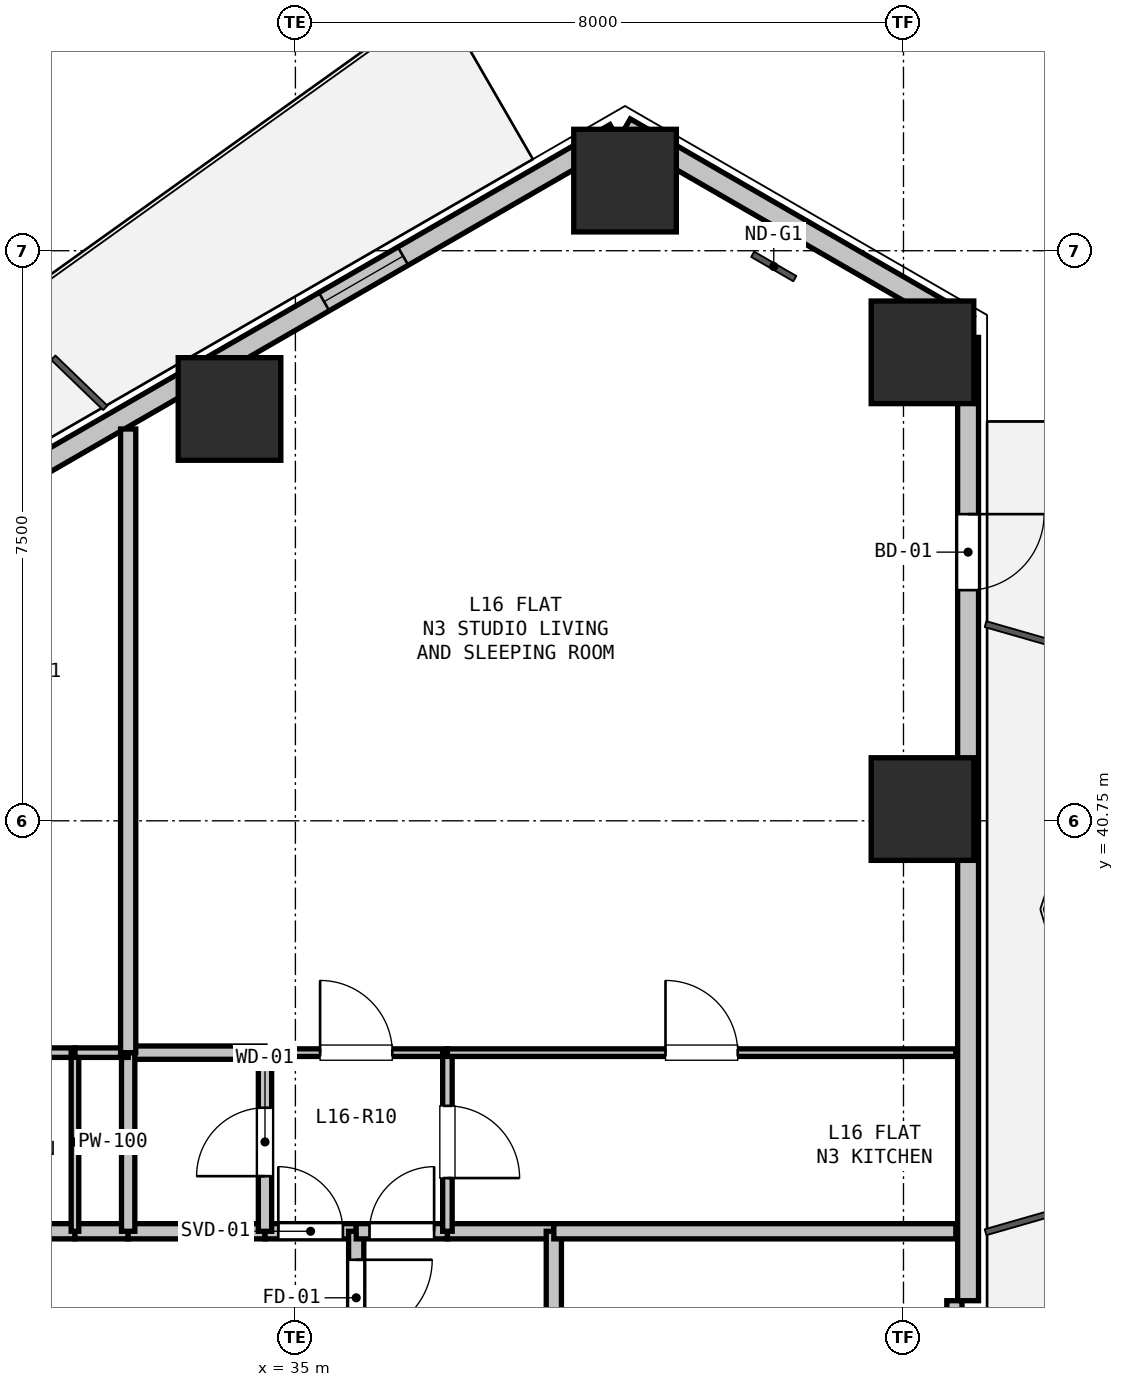
"""IFC4 building model, lengths in metres.
Left out: names, types, materials, properties, quantities, classifications, styles, units other than length and angle.
Written with IfcOpenShell. Run it as: python <this file> out.ifc"""

import sys

from ifc_helpers import new_model, si_unit, direction, frame, frame_2d, origin, origin_2d, place, context, subcontext, project, spatial, rectangle, hollow_rectangle, extrude, element, fill, save


model = new_model("IFC4")
c1 = context("Model", 3, precision=1e-05, world=origin(), true_north=direction((0.0, 1.0)))
c2 = subcontext(c1, "Body", "Model", "MODEL_VIEW")
j1 = project(units=[si_unit("LENGTHUNIT", "METRE"), si_unit("PLANEANGLEUNIT", "RADIAN")], contexts=[c1])
p1 = place(None, origin())
s1 = spatial("IfcSite", under=j1, at=p1, CompositionType="ELEMENT")
p2 = place(p1, origin())
s2 = spatial("IfcBuilding", under=s1, at=p2, CompositionType="ELEMENT")
p3 = place(p2, frame((0.0, 0.0, 58.8)))
s3 = spatial("IfcBuildingStorey", under=s2, at=p3, CompositionType="ELEMENT", Elevation=58.8)
for number, where, z_axis, x_axis in (
    (1, (34.133, 46.168, 0.0), (0.0, 0.0, 1.0), (1.0, 0.0, 0.0)),
    (2, (39.337, 49.173, 0.0), (0.0, 0.0, 1.0), (1.0, 0.0, 0.0)),
    (3, (43.25, 46.913, 0.0), (0.0, 0.0, 1.0), (1.0, 0.0, 0.0)),
    (4, (43.25, 40.905, 0.0), (0.0, 0.0, 1.0), (1.0, 0.0, 0.0)),
):
    element("IfcColumn", number, at=place(p3, frame(where, z_axis=z_axis, x_axis=x_axis)), inside=s3, PredefinedType="COLUMN", context=c2, shape_type="SweptSolid", body=[
        extrude(hollow_rectangle(XDim=1.35, YDim=1.35, WallThickness=0.036, at=origin_2d()), origin(), (0.0, 0.0, 1.0), 3.3),
    ])
p4 = place(p3, frame((39.337, 49.865, 0.0), z_axis=(0.0, 0.0, 1.0), x_axis=(0.866043601342, -0.499968479581, 0.0)))
e5 = element("IfcWall", 5, at=p4, inside=s3, PredefinedType="SOLIDWALL", context=c2, shape_type="SweptSolid", body=[
    extrude(rectangle(XDim=5.211, YDim=0.275, at=frame_2d((2.605, 0.0))), origin(), (0.0, 0.0, 1.0), 2.64),
])
p5 = place(p3, frame((28.232, 43.454, 0.0), z_axis=(0.0, 0.0, 1.0), x_axis=(0.86603192154, 0.499988710747, 0.0)))
e6 = element("IfcWall", 6, at=p5, inside=s3, PredefinedType="SOLIDWALL", context=c2, shape_type="SweptSolid", body=[
    extrude(rectangle(XDim=12.673, YDim=0.275, at=frame_2d((6.336, 0.0))), origin(), (0.0, 0.0, 1.0), 2.64),
])
p6 = place(p5, frame((2.417, 0.0, 0.9)))
e7 = element("IfcOpeningElement", 7, at=p6, cuts=e6, PredefinedType="OPENING", context=c2, shape_type="SweptSolid", body=[
    extrude(rectangle(XDim=1.2, YDim=1.4, at=frame_2d((0.6, 0.7))), frame((0.0, 0.147, 0.0), z_axis=(0.0, -1.0, 0.0), x_axis=(1.0, 0.0, 0.0)), (0.0, 0.0, 1.0), 0.295),
])
p7 = place(p5, frame((8.251, 0.0, 0.9)))
e8 = element("IfcOpeningElement", 8, at=p7, cuts=e6, PredefinedType="OPENING", context=c2, shape_type="SweptSolid", body=[
    extrude(rectangle(XDim=1.2, YDim=1.4, at=frame_2d((0.6, 0.7))), frame((0.0, 0.147, 0.0), z_axis=(0.0, -1.0, 0.0), x_axis=(1.0, 0.0, 0.0)), (0.0, 0.0, 1.0), 0.295),
])
p8 = place(p3, frame((43.85, 47.11, 0.0), z_axis=(0.0, 0.0, 1.0), x_axis=(0.0, -1.0, 0.0)))
e9 = element("IfcWall", 9, at=p8, inside=s3, PredefinedType="SOLIDWALL", context=c2, shape_type="SweptSolid", body=[
    extrude(rectangle(XDim=12.673, YDim=0.275, at=frame_2d((6.336, 0.0))), origin(), (0.0, 0.0, 1.0), 2.64),
])
p9 = place(p8, frame((2.325, 0.0, 0.0)))
e10 = element("IfcOpeningElement", 10, at=p9, cuts=e9, PredefinedType="OPENING", context=c2, shape_type="SweptSolid", body=[
    extrude(rectangle(XDim=1.0, YDim=2.1, at=frame_2d((0.5, 1.05))), frame((0.0, 0.147, 0.0), z_axis=(0.0, -1.0, 0.0), x_axis=(1.0, 0.0, 0.0)), (0.0, 0.0, 1.0), 0.295),
])
p10 = place(p3, frame((43.67, 34.437, 0.0), z_axis=(0.0, 0.0, 1.0), x_axis=(0.0, -1.0, 0.0)))
e11 = element("IfcWall", 11, at=p10, inside=s3, PredefinedType="PARAPET", context=c2, shape_type="SweptSolid", body=[
    extrude(rectangle(XDim=1.7, YDim=0.2, at=frame_2d((0.85, 0.0))), origin(), (0.0, 0.0, 1.0), 2.64),
])
p11 = place(p3, frame((29.1, 35.35, 0.0), z_axis=(0.0, 0.0, 1.0), x_axis=(1.0, 0.0, 0.0)))
e12 = element("IfcWall", 12, at=p11, inside=s3, PredefinedType="PARTITIONING", context=c2, shape_type="SweptSolid", body=[
    extrude(rectangle(XDim=3.0, YDim=0.2, at=frame_2d((1.5, 0.0))), origin(), (0.0, 0.0, 1.0), 3.02),
])
p12 = place(p3, frame((32.1, 35.35, 0.0), z_axis=(0.0, 0.0, 1.0), x_axis=(1.0, 0.0, 0.0)))
e13 = element("IfcWall", 13, at=p12, inside=s3, PredefinedType="PARTITIONING", context=c2, shape_type="SweptSolid", body=[
    extrude(rectangle(XDim=0.7, YDim=0.2, at=frame_2d((0.35, 0.0))), origin(), (0.0, 0.0, 1.0), 3.02),
])
p13 = place(p3, frame((32.8, 35.35, 0.0), z_axis=(0.0, 0.0, 1.0), x_axis=(1.0, 0.0, 0.0)))
e14 = element("IfcWall", 14, at=p13, inside=s3, PredefinedType="PARTITIONING", context=c2, shape_type="SweptSolid", body=[
    extrude(rectangle(XDim=1.8, YDim=0.2, at=frame_2d((0.9, 0.0))), origin(), (0.0, 0.0, 1.0), 3.02),
])
p14 = place(p3, frame((34.6, 35.35, 0.0), z_axis=(0.0, 0.0, 1.0), x_axis=(1.0, 0.0, 0.0)))
e15 = element("IfcWall", 15, at=p14, inside=s3, PredefinedType="PARTITIONING", context=c2, shape_type="SweptSolid", body=[
    extrude(rectangle(XDim=1.2, YDim=0.2, at=frame_2d((0.6, 0.0))), origin(), (0.0, 0.0, 1.0), 3.02),
])
p15 = place(p14, frame((0.175, 0.0, 0.0)))
e16 = element("IfcOpeningElement", 16, at=p15, cuts=e15, PredefinedType="OPENING", context=c2, shape_type="SweptSolid", body=[
    extrude(rectangle(XDim=0.85, YDim=2.1, at=frame_2d((0.425, 1.05))), frame((0.0, 0.11, 0.0), z_axis=(0.0, -1.0, 0.0), x_axis=(1.0, 0.0, 0.0)), (0.0, 0.0, 1.0), 0.22),
])
p16 = place(p3, frame((35.8, 35.35, 0.0), z_axis=(0.0, 0.0, 1.0), x_axis=(0.0, -1.0, 0.0)))
e17 = element("IfcWall", 17, at=p16, inside=s3, PredefinedType="PARTITIONING", context=c2, shape_type="SweptSolid", body=[
    extrude(rectangle(XDim=1.75, YDim=0.2, at=frame_2d((0.875, 0.0))), origin(), (0.0, 0.0, 1.0), 3.02),
])
p17 = place(p16, frame((0.375, 0.0, 0.0)))
e18 = element("IfcOpeningElement", 18, at=p17, cuts=e17, PredefinedType="OPENING", context=c2, shape_type="SweptSolid", body=[
    extrude(rectangle(XDim=1.0, YDim=2.15, at=frame_2d((0.5, 1.075))), frame((0.0, 0.11, 0.0), z_axis=(0.0, -1.0, 0.0), x_axis=(1.0, 0.0, 0.0)), (0.0, 0.0, 1.0), 0.22),
])
p18 = place(p3, frame((35.8, 35.35, 0.0), z_axis=(0.0, 0.0, 1.0), x_axis=(1.0, 0.0, 0.0)))
e19 = element("IfcWall", 19, at=p18, inside=s3, PredefinedType="PARTITIONING", context=c2, shape_type="SweptSolid", body=[
    extrude(rectangle(XDim=1.2, YDim=0.2, at=frame_2d((0.6, 0.0))), origin(), (0.0, 0.0, 1.0), 2.317),
])
p19 = place(p18, frame((0.175, 0.0, 0.0)))
e20 = element("IfcOpeningElement", 20, at=p19, cuts=e19, PredefinedType="OPENING", context=c2, shape_type="SweptSolid", body=[
    extrude(rectangle(XDim=0.85, YDim=2.1, at=frame_2d((0.425, 1.05))), frame((0.0, 0.11, 0.0), z_axis=(0.0, -1.0, 0.0), x_axis=(1.0, 0.0, 0.0)), (0.0, 0.0, 1.0), 0.22),
])
p20 = place(p3, frame((37.0, 35.35, 0.0), z_axis=(0.0, 0.0, 1.0), x_axis=(1.0, 0.0, 0.0)))
e21 = element("IfcWall", 21, at=p20, inside=s3, PredefinedType="PARTITIONING", context=c2, shape_type="SweptSolid", body=[
    extrude(rectangle(XDim=1.4, YDim=0.2, at=frame_2d((0.7, 0.0))), origin(), (0.0, 0.0, 1.0), 2.317),
])
p21 = place(p3, frame((38.4, 35.35, 0.0), z_axis=(0.0, 0.0, 1.0), x_axis=(0.0, -1.0, 0.0)))
e22 = element("IfcWall", 22, at=p21, inside=s3, PredefinedType="PARTITIONING", context=c2, shape_type="SweptSolid", body=[
    extrude(rectangle(XDim=6.95, YDim=0.2, at=frame_2d((3.475, 0.0))), origin(), (0.0, 0.0, 1.0), 2.317),
])
p22 = place(p3, frame((34.6, 37.7, 0.0), z_axis=(0.0, 0.0, 1.0), x_axis=(1.0, 0.0, 0.0)))
e23 = element("IfcWall", 23, at=p22, inside=s3, PredefinedType="PARTITIONING", context=c2, shape_type="SweptSolid", body=[
    extrude(rectangle(XDim=2.4, YDim=0.1, at=frame_2d((1.2, 0.0))), origin(), (0.0, 0.0, 1.0), 2.317),
])
p23 = place(p22, frame((0.725, 0.0, 0.0)))
e24 = element("IfcOpeningElement", 24, at=p23, cuts=e23, PredefinedType="OPENING", context=c2, shape_type="SweptSolid", body=[
    extrude(rectangle(XDim=0.95, YDim=2.1, at=frame_2d((0.475, 1.05))), frame((0.0, 0.06, 0.0), z_axis=(0.0, -1.0, 0.0), x_axis=(1.0, 0.0, 0.0)), (0.0, 0.0, 1.0), 0.12),
])
p24 = place(p3, frame((37.0, 37.7, 0.0), z_axis=(0.0, 0.0, 1.0), x_axis=(0.0, -1.0, 0.0)))
e25 = element("IfcWall", 25, at=p24, inside=s3, PredefinedType="PARTITIONING", context=c2, shape_type="SweptSolid", body=[
    extrude(rectangle(XDim=2.35, YDim=0.125, at=frame_2d((1.175, 0.0))), origin(), (0.0, 0.0, 1.0), 2.317),
])
p25 = place(p24, frame((0.7, 0.0, 0.0)))
e26 = element("IfcOpeningElement", 26, at=p25, cuts=e25, PredefinedType="OPENING", context=c2, shape_type="SweptSolid", body=[
    extrude(rectangle(XDim=0.95, YDim=2.1, at=frame_2d((0.475, 1.05))), frame((0.0, 0.073, 0.0), z_axis=(0.0, -1.0, 0.0), x_axis=(1.0, 0.0, 0.0)), (0.0, 0.0, 1.0), 0.145),
])
p26 = place(p3, frame((34.6, 35.35, 0.0), z_axis=(0.0, 0.0, 1.0), x_axis=(0.0, 1.0, 0.0)))
e27 = element("IfcWall", 27, at=p26, inside=s3, PredefinedType="PLUMBINGWALL", context=c2, shape_type="SweptSolid", body=[
    extrude(rectangle(XDim=2.35, YDim=0.175, at=frame_2d((1.175, 0.0))), origin(), (0.0, 0.0, 1.0), 3.02),
])
p27 = place(p26, frame((0.725, 0.0, 0.0)))
e28 = element("IfcOpeningElement", 28, at=p27, cuts=e27, PredefinedType="OPENING", context=c2, shape_type="SweptSolid", body=[
    extrude(rectangle(XDim=0.9, YDim=2.1, at=frame_2d((0.45, 1.05))), frame((0.0, 0.097, 0.0), z_axis=(0.0, -1.0, 0.0), x_axis=(1.0, 0.0, 0.0)), (0.0, 0.0, 1.0), 0.195),
])
p28 = place(p3, frame((29.2, 37.7, 0.0), z_axis=(0.0, 0.0, 1.0), x_axis=(1.0, 0.0, 0.0)))
e29 = element("IfcWall", 29, at=p28, inside=s3, PredefinedType="PARTITIONING", context=c2, shape_type="SweptSolid", body=[
    extrude(rectangle(XDim=2.9, YDim=0.125, at=frame_2d((1.45, 0.0))), origin(), (0.0, 0.0, 1.0), 3.02),
])
p29 = place(p3, frame((32.1, 37.7, 0.0), z_axis=(0.0, 0.0, 1.0), x_axis=(0.0, -1.0, 0.0)))
e30 = element("IfcWall", 30, at=p29, inside=s3, PredefinedType="PARTITIONING", context=c2, shape_type="SweptSolid", body=[
    extrude(rectangle(XDim=2.35, YDim=0.1, at=frame_2d((1.175, 0.0))), origin(), (0.0, 0.0, 1.0), 3.02),
])
p30 = place(p3, frame((32.8, 37.7, 0.0), z_axis=(0.0, 0.0, 1.0), x_axis=(1.0, 0.0, 0.0)))
e31 = element("IfcWall", 31, at=p30, inside=s3, PredefinedType="PLUMBINGWALL", context=c2, shape_type="SweptSolid", body=[
    extrude(rectangle(XDim=1.8, YDim=0.175, at=frame_2d((0.9, 0.0))), origin(), (0.0, 0.0, 1.0), 3.02),
])
p31 = place(p3, frame((32.8, 35.35, 0.0), z_axis=(0.0, 0.0, 1.0), x_axis=(0.0, 1.0, 0.0)))
e32 = element("IfcWall", 32, at=p31, inside=s3, PredefinedType="PLUMBINGWALL", context=c2, shape_type="SweptSolid", body=[
    extrude(rectangle(XDim=2.35, YDim=0.175, at=frame_2d((1.175, 0.0))), origin(), (0.0, 0.0, 1.0), 3.02),
])
p32 = place(p3, frame((43.688, 35.35, 0.0), z_axis=(0.0, 0.0, 1.0), x_axis=(-1.0, 0.0, 0.0)))
e33 = element("IfcWall", 33, at=p32, inside=s3, PredefinedType="PARTITIONING", context=c2, shape_type="SweptSolid", body=[
    extrude(rectangle(XDim=5.289, YDim=0.2, at=frame_2d((2.644, 0.0))), origin(), (0.0, 0.0, 1.0), 2.317),
])
p33 = place(p3, frame((37.0, 37.7, 0.0), z_axis=(0.0, 0.0, 1.0), x_axis=(1.0, 0.0, 0.0)))
e34 = element("IfcWall", 34, at=p33, inside=s3, PredefinedType="PARTITIONING", context=c2, shape_type="SweptSolid", body=[
    extrude(rectangle(XDim=6.688, YDim=0.1, at=frame_2d((3.344, 0.0))), origin(), (0.0, 0.0, 1.0), 2.317),
])
p34 = place(p33, frame((2.869, 0.0, 0.0)))
e35 = element("IfcOpeningElement", 35, at=p34, cuts=e34, PredefinedType="OPENING", context=c2, shape_type="SweptSolid", body=[
    extrude(rectangle(XDim=0.95, YDim=2.1, at=frame_2d((0.475, 1.05))), frame((0.0, 0.06, 0.0), z_axis=(0.0, -1.0, 0.0), x_axis=(1.0, 0.0, 0.0)), (0.0, 0.0, 1.0), 0.12),
])
p35 = place(p3, frame((32.8, 37.7, 0.0), z_axis=(0.0, 0.0, 1.0), x_axis=(-1.0, 0.0, 0.0)))
e36 = element("IfcWall", 36, at=p35, inside=s3, PredefinedType="PARTITIONING", context=c2, shape_type="SweptSolid", body=[
    extrude(rectangle(XDim=0.7, YDim=0.125, at=frame_2d((0.35, 0.0))), origin(), (0.0, 0.0, 1.0), 3.02),
])
p36 = place(p3, frame((32.8, 45.905, 0.0), z_axis=(0.0, 0.0, 1.0), x_axis=(0.0, -1.0, 0.0)))
e37 = element("IfcWall", 37, at=p36, inside=s3, PredefinedType="PARTITIONING", context=c2, shape_type="SweptSolid", body=[
    extrude(rectangle(XDim=8.205, YDim=0.2, at=frame_2d((4.103, 0.0))), origin(), (0.0, 0.0, 1.0), 2.365),
])
p37 = place(p7, origin())
e38 = element("IfcWindow", 38, at=p37, inside=s3, PartitioningType="SINGLE_PANEL", PredefinedType="WINDOW", context=c2, shape_type="SweptSolid", body=[
    extrude(rectangle(XDim=1.2, YDim=1.4, at=frame_2d((0.6, 0.7))), frame((0.0, 0.03, 0.0), z_axis=(0.0, -1.0, 0.0), x_axis=(1.0, 0.0, 0.0)), (0.0, 0.0, 1.0), 0.06),
])
fill(e8, e38)
p38 = place(p9, origin())
e39 = element("IfcDoor", 39, at=p38, inside=s3, OperationType="SINGLE_SWING_LEFT", PredefinedType="DOOR", context=c2, shape_type="SweptSolid", body=[
    extrude(rectangle(XDim=1.0, YDim=2.1, at=frame_2d((0.5, 1.05))), frame((0.0, 0.025, 0.0), z_axis=(0.0, -1.0, 0.0), x_axis=(1.0, 0.0, 0.0)), (0.0, 0.0, 1.0), 0.05),
])
fill(e10, e39)
p39 = place(p17, origin())
e40 = element("IfcDoor", 40, at=p39, inside=s3, OperationType="SINGLE_SWING_LEFT", PredefinedType="DOOR", context=c2, shape_type="SweptSolid", body=[
    extrude(rectangle(XDim=1.0, YDim=2.15, at=frame_2d((0.5, 1.075))), frame((0.0, 0.025, 0.0), z_axis=(0.0, -1.0, 0.0), x_axis=(1.0, 0.0, 0.0)), (0.0, 0.0, 1.0), 0.05),
])
fill(e18, e40)
p40 = place(p15, origin())
e41 = element("IfcDoor", 41, at=p40, inside=s3, OperationType="SINGLE_SWING_LEFT", PredefinedType="DOOR", context=c2, shape_type="SweptSolid", body=[
    extrude(rectangle(XDim=0.85, YDim=2.1, at=frame_2d((0.425, 1.05))), frame((0.0, 0.025, 0.0), z_axis=(0.0, -1.0, 0.0), x_axis=(1.0, 0.0, 0.0)), (0.0, 0.0, 1.0), 0.05),
])
fill(e16, e41)
p41 = place(p19, origin())
e42 = element("IfcDoor", 42, at=p41, inside=s3, OperationType="SINGLE_SWING_RIGHT", PredefinedType="DOOR", context=c2, shape_type="SweptSolid", body=[
    extrude(rectangle(XDim=0.85, YDim=2.1, at=frame_2d((0.425, 1.05))), frame((0.0, 0.025, 0.0), z_axis=(0.0, -1.0, 0.0), x_axis=(1.0, 0.0, 0.0)), (0.0, 0.0, 1.0), 0.05),
])
fill(e20, e42)
p42 = place(p27, origin())
e43 = element("IfcDoor", 43, at=p42, inside=s3, OperationType="SINGLE_SWING_LEFT", PredefinedType="DOOR", context=c2, shape_type="SweptSolid", body=[
    extrude(rectangle(XDim=0.9, YDim=2.1, at=frame_2d((0.45, 1.05))), frame((0.0, 0.025, 0.0), z_axis=(0.0, -1.0, 0.0), x_axis=(1.0, 0.0, 0.0)), (0.0, 0.0, 1.0), 0.05),
])
fill(e28, e43)
p43 = place(p25, origin())
e44 = element("IfcDoor", 44, at=p43, inside=s3, OperationType="SINGLE_SWING_RIGHT", PredefinedType="DOOR", context=c2, shape_type="SweptSolid", body=[
    extrude(rectangle(XDim=0.95, YDim=2.1, at=frame_2d((0.475, 1.05))), frame((0.0, 0.025, 0.0), z_axis=(0.0, -1.0, 0.0), x_axis=(1.0, 0.0, 0.0)), (0.0, 0.0, 1.0), 0.05),
])
fill(e26, e44)
p44 = place(p23, origin())
e45 = element("IfcDoor", 45, at=p44, inside=s3, OperationType="SINGLE_SWING_LEFT", PredefinedType="DOOR", context=c2, shape_type="SweptSolid", body=[
    extrude(rectangle(XDim=0.95, YDim=2.1, at=frame_2d((0.475, 1.05))), frame((0.0, 0.025, 0.0), z_axis=(0.0, -1.0, 0.0), x_axis=(1.0, 0.0, 0.0)), (0.0, 0.0, 1.0), 0.05),
])
fill(e24, e45)
p45 = place(p34, origin())
e46 = element("IfcDoor", 46, at=p45, inside=s3, OperationType="SINGLE_SWING_LEFT", PredefinedType="DOOR", context=c2, shape_type="SweptSolid", body=[
    extrude(rectangle(XDim=0.95, YDim=2.1, at=frame_2d((0.475, 1.05))), frame((0.0, 0.025, 0.0), z_axis=(0.0, -1.0, 0.0), x_axis=(1.0, 0.0, 0.0)), (0.0, 0.0, 1.0), 0.05),
])
fill(e35, e46)
save(model, sys.argv[1])
